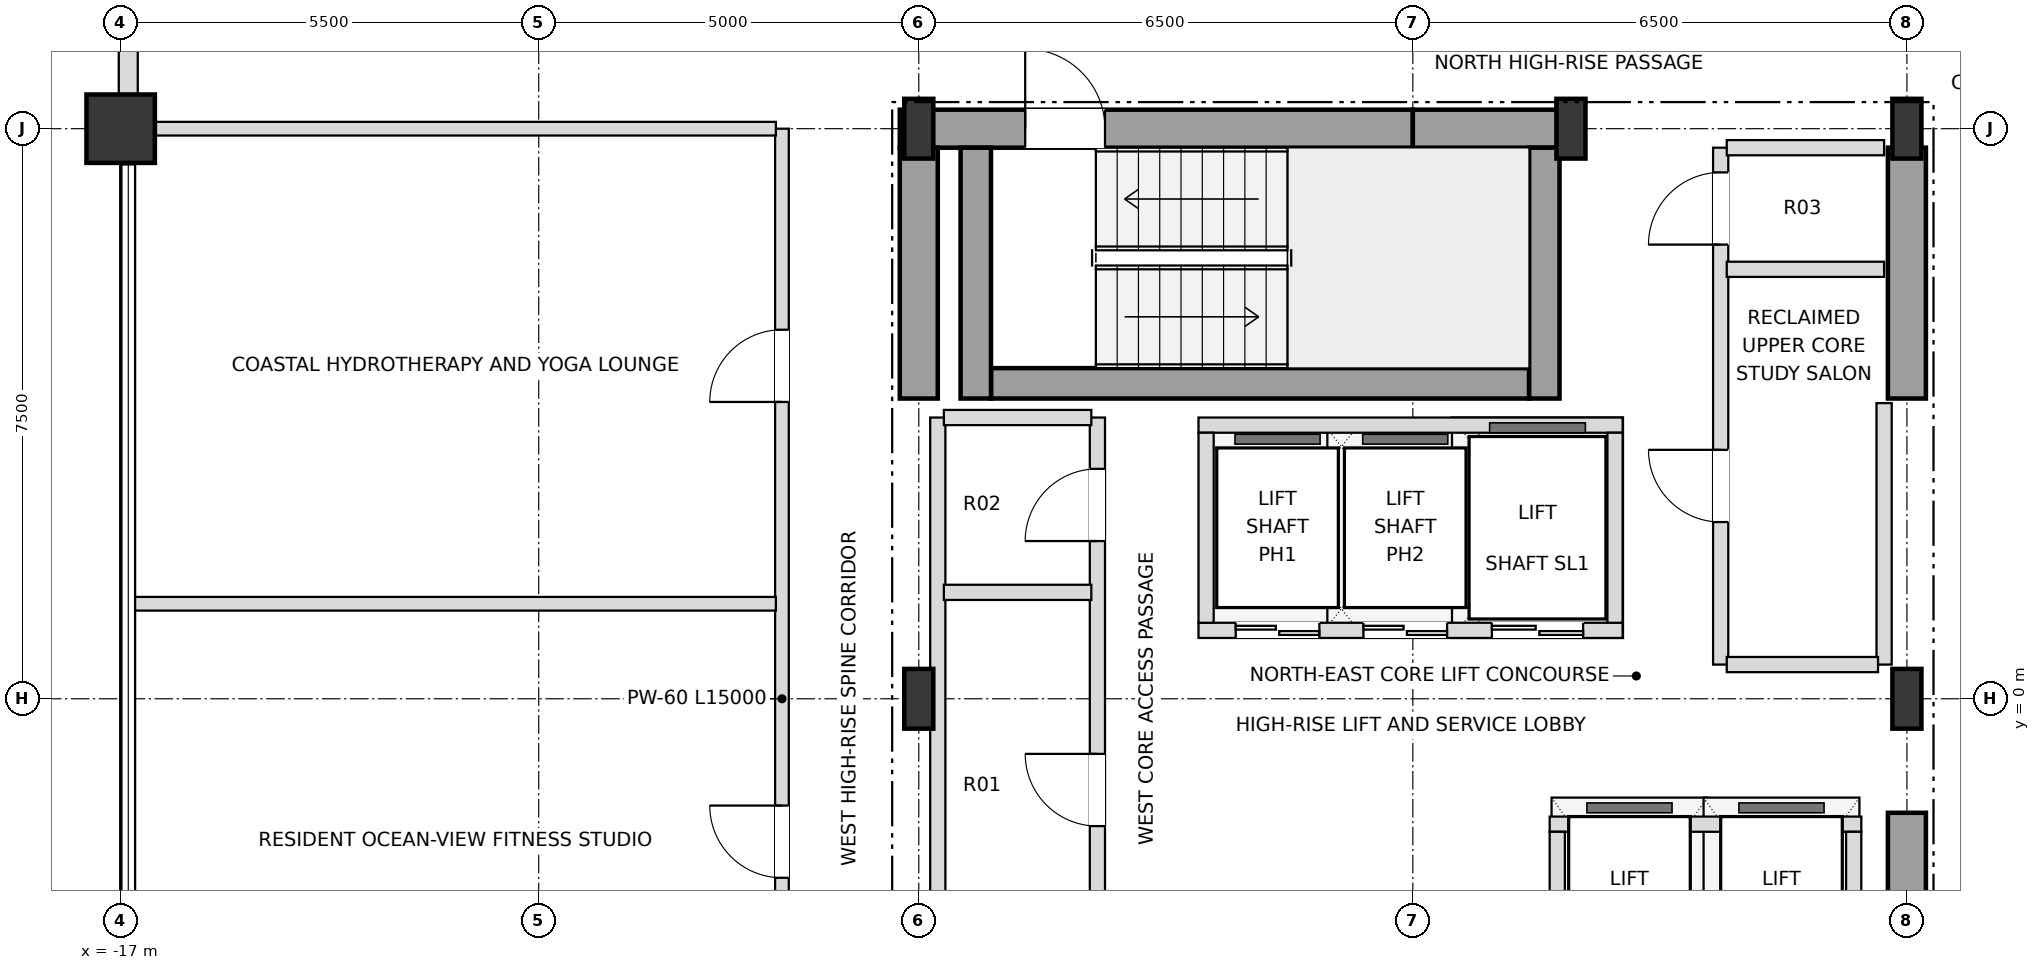
"""IFC4 building model, lengths in metres.
Left out: names, types, materials, properties, quantities, classifications, styles, units other than length and angle.
Written with IfcOpenShell. Run it as: python <this file> out.ifc"""

import sys

from ifc_helpers import new_model, si_unit, direction, frame, frame_2d, origin, origin_2d, place, context, subcontext, project, spatial, rectangle, i_section, extrude, element, fill, save


model = new_model("IFC4")
c1 = context("Model", 3, precision=1e-05, world=origin(), true_north=direction((0.0, 1.0)))
c2 = subcontext(c1, "Body", "Model", "MODEL_VIEW")
j1 = project(units=[si_unit("LENGTHUNIT", "METRE"), si_unit("PLANEANGLEUNIT", "RADIAN")], contexts=[c1])
p1 = place(None, origin())
s1 = spatial("IfcSite", under=j1, at=p1, CompositionType="ELEMENT")
p2 = place(p1, origin())
s2 = spatial("IfcBuilding", under=s1, at=p2, CompositionType="ELEMENT")
p3 = place(p2, frame((0.0, 0.0, 276.3)))
s3 = spatial("IfcBuildingStorey", under=s2, at=p3, CompositionType="ELEMENT", Elevation=276.3)
for number, where, z_axis, x_axis in (
    (1, (-6.5, 0.0, 0.0), (0.0, 0.0, 1.0), (1.0, 0.0, 0.0)),
    (2, (6.5, 0.0, 0.0), (0.0, 0.0, 1.0), (1.0, 0.0, 0.0)),
    (3, (-6.5, 7.5, 0.0), (0.0, 0.0, 1.0), (1.0, 0.0, 0.0)),
    (4, (2.08, 7.5, 0.0), (0.0, 0.0, 1.0), (1.0, 0.0, 0.0)),
    (5, (6.5, 7.5, 0.0), (0.0, 0.0, 1.0), (1.0, 0.0, 0.0)),
):
    element("IfcColumn", number, at=place(p3, frame(where, z_axis=z_axis, x_axis=x_axis)), inside=s3, PredefinedType="COLUMN", context=c2, shape_type="SweptSolid", body=[
        extrude(i_section(OverallWidth=0.382, OverallDepth=0.786, WebThickness=0.02, FlangeThickness=0.033, at=origin_2d()), origin(), (0.0, 0.0, 1.0), 3.6),
    ])
p4 = place(p3, frame((-17.0, 7.5, 0.0), z_axis=(0.0, 0.0, 1.0), x_axis=(1.0, 0.0, 0.0)))
e6 = element("IfcColumn", 6, at=p4, inside=s3, PredefinedType="USERDEFINED", context=c2, shape_type="SweptSolid", body=[
    extrude(rectangle(XDim=0.9, YDim=0.9, at=origin_2d()), origin(), (0.0, 0.0, 1.0), 3.6),
])
p5 = place(p3, frame((-16.9, 12.555, 0.0), z_axis=(0.0, 0.0, 1.0), x_axis=(0.0, -1.0, 0.0)))
e7 = element("IfcWall", 7, at=p5, inside=s3, PredefinedType="SOLIDWALL", context=c2, shape_type="SweptSolid", body=[
    extrude(rectangle(XDim=4.61, YDim=0.25, at=frame_2d((2.305, 0.0))), origin(), (0.0, 0.0, 1.0), 2.748),
])
p6 = place(p5, frame((1.405, 0.0, 0.72)))
e8 = element("IfcOpeningElement", 8, at=p6, cuts=e7, PredefinedType="OPENING", context=c2, shape_type="SweptSolid", body=[
    extrude(rectangle(XDim=1.8, YDim=1.68, at=frame_2d((0.9, 0.84))), frame((0.0, 0.135, 0.0), z_axis=(0.0, -1.0, 0.0), x_axis=(1.0, 0.0, 0.0)), (0.0, 0.0, 1.0), 0.27),
])
p7 = place(p3, frame((-6.75, 7.5, 0.0), z_axis=(0.0, 0.0, 1.0), x_axis=(1.0, 0.0, 0.0)))
e9 = element("IfcWall", 9, at=p7, inside=s3, PredefinedType="SHEAR", context=c2, shape_type="SweptSolid", body=[
    extrude(rectangle(XDim=6.75, YDim=0.5, at=frame_2d((3.375, 0.0))), origin(), (0.0, 0.0, 1.0), 3.38),
])
p8 = place(p7, frame((1.65, 0.0, 0.0)))
e10 = element("IfcOpeningElement", 10, at=p8, cuts=e9, PredefinedType="OPENING", context=c2, shape_type="SweptSolid", body=[
    extrude(rectangle(XDim=1.05, YDim=2.15, at=frame_2d((0.525, 1.075))), frame((0.0, 0.26, 0.0), z_axis=(0.0, -1.0, 0.0), x_axis=(1.0, 0.0, 0.0)), (0.0, 0.0, 1.0), 0.52),
])
p9 = place(p3, frame((0.0, 7.5, 0.0), z_axis=(0.0, 0.0, 1.0), x_axis=(1.0, 0.0, 0.0)))
e11 = element("IfcWall", 11, at=p9, inside=s3, PredefinedType="SHEAR", context=c2, shape_type="SweptSolid", body=[
    extrude(rectangle(XDim=2.08, YDim=0.5, at=frame_2d((1.04, 0.0))), origin(), (0.0, 0.0, 1.0), 3.38),
])
p10 = place(p3, frame((-6.5, 3.95, 0.0), z_axis=(0.0, 0.0, 1.0), x_axis=(0.0, 1.0, 0.0)))
e12 = element("IfcWall", 12, at=p10, inside=s3, PredefinedType="SHEAR", context=c2, shape_type="SweptSolid", body=[
    extrude(rectangle(XDim=3.3, YDim=0.5, at=frame_2d((1.65, 0.0))), origin(), (0.0, 0.0, 1.0), 3.38),
])
p11 = place(p3, frame((6.5, -7.25, 0.0), z_axis=(0.0, 0.0, 1.0), x_axis=(0.0, 1.0, 0.0)))
e13 = element("IfcWall", 13, at=p11, inside=s3, PredefinedType="SHEAR", context=c2, shape_type="SweptSolid", body=[
    extrude(rectangle(XDim=5.75, YDim=0.5, at=frame_2d((2.875, 0.0))), origin(), (0.0, 0.0, 1.0), 3.38),
])
p12 = place(p11, frame((0.85, 0.0, 0.0)))
e14 = element("IfcOpeningElement", 14, at=p12, cuts=e13, PredefinedType="OPENING", context=c2, shape_type="SweptSolid", body=[
    extrude(rectangle(XDim=1.05, YDim=2.15, at=frame_2d((0.525, 1.075))), frame((0.0, 0.26, 0.0), z_axis=(0.0, -1.0, 0.0), x_axis=(1.0, 0.0, 0.0)), (0.0, 0.0, 1.0), 0.52),
])
p13 = place(p3, frame((6.5, 3.95, 0.0), z_axis=(0.0, 0.0, 1.0), x_axis=(0.0, 1.0, 0.0)))
e15 = element("IfcWall", 15, at=p13, inside=s3, PredefinedType="SHEAR", context=c2, shape_type="SweptSolid", body=[
    extrude(rectangle(XDim=3.3, YDim=0.5, at=frame_2d((1.65, 0.0))), origin(), (0.0, 0.0, 1.0), 3.38),
])
p14 = place(p3, frame((-5.55, 4.15, 0.0), z_axis=(0.0, 0.0, 1.0), x_axis=(1.0, 0.0, 0.0)))
e16 = element("IfcWall", 16, at=p14, inside=s3, PredefinedType="SHEAR", context=c2, shape_type="SweptSolid", body=[
    extrude(rectangle(XDim=7.08, YDim=0.4, at=frame_2d((3.54, 0.0))), origin(), (0.0, 0.0, 1.0), 3.38),
])
for number, where, z_axis, x_axis in (
    (17, (1.73, 3.95, 0.0), (0.0, 0.0, 1.0), (0.0, 1.0, 0.0)),
    (18, (-5.75, 3.95, 0.0), (0.0, 0.0, 1.0), (0.0, 1.0, 0.0)),
):
    element("IfcWall", number, at=place(p3, frame(where, z_axis=z_axis, x_axis=x_axis)), inside=s3, PredefinedType="SHEAR", context=c2, shape_type="SweptSolid", body=[
        extrude(rectangle(XDim=3.3, YDim=0.4, at=frame_2d((1.65, 0.0))), origin(), (0.0, 0.0, 1.0), 3.38),
    ])
p15 = place(p3, frame((-2.82, 0.9, 0.0), z_axis=(0.0, 0.0, 1.0), x_axis=(1.0, 0.0, 0.0)))
e19 = element("IfcWall", 19, at=p15, inside=s3, PredefinedType="SOLIDWALL", context=c2, shape_type="SweptSolid", body=[
    extrude(rectangle(XDim=5.58, YDim=0.2, at=frame_2d((2.79, 0.0))), origin(), (0.0, 0.0, 1.0), 3.38),
])
p16 = place(p15, frame((0.49, 0.0, 0.0)))
e20 = element("IfcOpeningElement", 20, at=p16, cuts=e19, PredefinedType="OPENING", context=c2, shape_type="SweptSolid", body=[
    extrude(rectangle(XDim=1.1, YDim=2.15, at=frame_2d((0.55, 1.075))), frame((0.0, 0.11, 0.0), z_axis=(0.0, -1.0, 0.0), x_axis=(1.0, 0.0, 0.0)), (0.0, 0.0, 1.0), 0.22),
])
p17 = place(p15, frame((2.17, 0.0, 0.0)))
e21 = element("IfcOpeningElement", 21, at=p17, cuts=e19, PredefinedType="OPENING", context=c2, shape_type="SweptSolid", body=[
    extrude(rectangle(XDim=1.1, YDim=2.15, at=frame_2d((0.55, 1.075))), frame((0.0, 0.11, 0.0), z_axis=(0.0, -1.0, 0.0), x_axis=(1.0, 0.0, 0.0)), (0.0, 0.0, 1.0), 0.22),
])
p18 = place(p15, frame((3.86, 0.0, 0.0)))
e22 = element("IfcOpeningElement", 22, at=p18, cuts=e19, PredefinedType="OPENING", context=c2, shape_type="SweptSolid", body=[
    extrude(rectangle(XDim=1.2, YDim=2.2, at=frame_2d((0.6, 1.1))), frame((0.0, 0.11, 0.0), z_axis=(0.0, -1.0, 0.0), x_axis=(1.0, 0.0, 0.0)), (0.0, 0.0, 1.0), 0.22),
])
p19 = place(p3, frame((-2.82, 3.6, 0.0), z_axis=(0.0, 0.0, 1.0), x_axis=(1.0, 0.0, 0.0)))
e23 = element("IfcWall", 23, at=p19, inside=s3, PredefinedType="SOLIDWALL", context=c2, shape_type="SweptSolid", body=[
    extrude(rectangle(XDim=5.58, YDim=0.2, at=frame_2d((2.79, 0.0))), origin(), (0.0, 0.0, 1.0), 3.38),
])
for number, where, z_axis, x_axis in (
    (24, (-2.72, 1.0, 0.0), (0.0, 0.0, 1.0), (0.0, 1.0, 0.0)),
    (25, (2.66, 1.0, 0.0), (0.0, 0.0, 1.0), (0.0, 1.0, 0.0)),
):
    element("IfcWall", number, at=place(p3, frame(where, z_axis=z_axis, x_axis=x_axis)), inside=s3, PredefinedType="SOLIDWALL", context=c2, shape_type="SweptSolid", body=[
        extrude(rectangle(XDim=2.5, YDim=0.2, at=frame_2d((1.25, 0.0))), origin(), (0.0, 0.0, 1.0), 3.38),
    ])
p20 = place(p3, frame((1.8, -1.65, 0.0), z_axis=(0.0, 0.0, 1.0), x_axis=(1.0, 0.0, 0.0)))
e26 = element("IfcWall", 26, at=p20, inside=s3, PredefinedType="SOLIDWALL", context=c2, shape_type="SweptSolid", body=[
    extrude(rectangle(XDim=4.1, YDim=0.2, at=frame_2d((2.05, 0.0))), origin(), (0.0, 0.0, 1.0), 3.38),
])
for number, where, z_axis, x_axis in (
    (27, (1.9, -3.75, 0.0), (0.0, 0.0, 1.0), (0.0, 1.0, 0.0)),
    (28, (5.8, -3.75, 0.0), (0.0, 0.0, 1.0), (0.0, 1.0, 0.0)),
):
    element("IfcWall", number, at=place(p3, frame(where, z_axis=z_axis, x_axis=x_axis)), inside=s3, PredefinedType="SOLIDWALL", context=c2, shape_type="SweptSolid", body=[
        extrude(rectangle(XDim=2.0, YDim=0.2, at=frame_2d((1.0, 0.0))), origin(), (0.0, 0.0, 1.0), 3.38),
    ])
p21 = place(p3, frame((-8.3, -7.5, 0.0), z_axis=(0.0, 0.0, 1.0), x_axis=(0.0, 1.0, 0.0)))
e29 = element("IfcWall", 29, at=p21, inside=s3, PredefinedType="PARTITIONING", context=c2, shape_type="SweptSolid", body=[
    extrude(rectangle(XDim=15.0, YDim=0.18, at=frame_2d((7.5, 0.0))), origin(), (0.0, 0.0, 1.0), 3.38),
])
p22 = place(p21, frame((0.775, 0.0, 0.0)))
e30 = element("IfcOpeningElement", 30, at=p22, cuts=e29, PredefinedType="OPENING", context=c2, shape_type="SweptSolid", body=[
    extrude(rectangle(XDim=0.95, YDim=2.15, at=frame_2d((0.475, 1.075))), frame((0.0, 0.1, 0.0), z_axis=(0.0, -1.0, 0.0), x_axis=(1.0, 0.0, 0.0)), (0.0, 0.0, 1.0), 0.2),
])
p23 = place(p21, frame((5.145, 0.0, 0.0)))
e31 = element("IfcOpeningElement", 31, at=p23, cuts=e29, PredefinedType="OPENING", context=c2, shape_type="SweptSolid", body=[
    extrude(rectangle(XDim=0.95, YDim=2.15, at=frame_2d((0.475, 1.075))), frame((0.0, 0.1, 0.0), z_axis=(0.0, -1.0, 0.0), x_axis=(1.0, 0.0, 0.0)), (0.0, 0.0, 1.0), 0.2),
])
p24 = place(p21, frame((11.405, 0.0, 0.0)))
e32 = element("IfcOpeningElement", 32, at=p24, cuts=e29, PredefinedType="OPENING", context=c2, shape_type="SweptSolid", body=[
    extrude(rectangle(XDim=0.95, YDim=2.15, at=frame_2d((0.475, 1.075))), frame((0.0, 0.1, 0.0), z_axis=(0.0, -1.0, 0.0), x_axis=(1.0, 0.0, 0.0)), (0.0, 0.0, 1.0), 0.2),
])
p25 = place(p3, frame((-6.25, -3.64, 0.0), z_axis=(0.0, 0.0, 1.0), x_axis=(0.0, 1.0, 0.0)))
e33 = element("IfcWall", 33, at=p25, inside=s3, PredefinedType="SOLIDWALL", context=c2, shape_type="SweptSolid", body=[
    extrude(rectangle(XDim=7.34, YDim=0.2, at=frame_2d((3.67, 0.0))), origin(), (0.0, 0.0, 1.0), 3.38),
])
p26 = place(p3, frame((-4.15, -3.7, 0.0), z_axis=(0.0, 0.0, 1.0), x_axis=(0.0, 1.0, 0.0)))
e34 = element("IfcWall", 34, at=p26, inside=s3, PredefinedType="SOLIDWALL", context=c2, shape_type="SweptSolid", body=[
    extrude(rectangle(XDim=7.4, YDim=0.2, at=frame_2d((3.7, 0.0))), origin(), (0.0, 0.0, 1.0), 3.38),
])
p27 = place(p26, frame((2.025, 0.0, 0.0)))
e35 = element("IfcOpeningElement", 35, at=p27, cuts=e34, PredefinedType="OPENING", context=c2, shape_type="SweptSolid", body=[
    extrude(rectangle(XDim=0.95, YDim=2.15, at=frame_2d((0.475, 1.075))), frame((0.0, 0.11, 0.0), z_axis=(0.0, -1.0, 0.0), x_axis=(1.0, 0.0, 0.0)), (0.0, 0.0, 1.0), 0.22),
])
p28 = place(p26, frame((5.775, 0.0, 0.0)))
e36 = element("IfcOpeningElement", 36, at=p28, cuts=e34, PredefinedType="OPENING", context=c2, shape_type="SweptSolid", body=[
    extrude(rectangle(XDim=0.95, YDim=2.15, at=frame_2d((0.475, 1.075))), frame((0.0, 0.11, 0.0), z_axis=(0.0, -1.0, 0.0), x_axis=(1.0, 0.0, 0.0)), (0.0, 0.0, 1.0), 0.22),
])
p29 = place(p3, frame((4.05, 0.45, 0.0), z_axis=(0.0, 0.0, 1.0), x_axis=(0.0, 1.0, 0.0)))
e37 = element("IfcWall", 37, at=p29, inside=s3, PredefinedType="SOLIDWALL", context=c2, shape_type="SweptSolid", body=[
    extrude(rectangle(XDim=6.8, YDim=0.2, at=frame_2d((3.4, 0.0))), origin(), (0.0, 0.0, 1.0), 3.38),
])
p30 = place(p29, frame((1.875, 0.0, 0.0)))
e38 = element("IfcOpeningElement", 38, at=p30, cuts=e37, PredefinedType="OPENING", context=c2, shape_type="SweptSolid", body=[
    extrude(rectangle(XDim=0.95, YDim=2.15, at=frame_2d((0.475, 1.075))), frame((0.0, 0.11, 0.0), z_axis=(0.0, -1.0, 0.0), x_axis=(1.0, 0.0, 0.0)), (0.0, 0.0, 1.0), 0.22),
])
p31 = place(p29, frame((5.525, 0.0, 0.0)))
e39 = element("IfcOpeningElement", 39, at=p31, cuts=e37, PredefinedType="OPENING", context=c2, shape_type="SweptSolid", body=[
    extrude(rectangle(XDim=0.95, YDim=2.15, at=frame_2d((0.475, 1.075))), frame((0.0, 0.11, 0.0), z_axis=(0.0, -1.0, 0.0), x_axis=(1.0, 0.0, 0.0)), (0.0, 0.0, 1.0), 0.22),
])
p32 = place(p3, frame((6.2, 0.45, 0.0), z_axis=(0.0, 0.0, 1.0), x_axis=(0.0, 1.0, 0.0)))
e40 = element("IfcWall", 40, at=p32, inside=s3, PredefinedType="SOLIDWALL", context=c2, shape_type="SweptSolid", body=[
    extrude(rectangle(XDim=3.44, YDim=0.2, at=frame_2d((1.72, 0.0))), origin(), (0.0, 0.0, 1.0), 3.38),
])
p33 = place(p3, frame((4.13, 0.45, 0.0), z_axis=(0.0, 0.0, 1.0), x_axis=(1.0, 0.0, 0.0)))
e41 = element("IfcWall", 41, at=p33, inside=s3, PredefinedType="SOLIDWALL", context=c2, shape_type="SweptSolid", body=[
    extrude(rectangle(XDim=1.99, YDim=0.2, at=frame_2d((0.995, 0.0))), origin(), (0.0, 0.0, 1.0), 3.38),
])
p34 = place(p3, frame((-16.82, 1.25, 0.0), z_axis=(0.0, 0.0, 1.0), x_axis=(1.0, 0.0, 0.0)))
e42 = element("IfcWall", 42, at=p34, inside=s3, PredefinedType="PARTITIONING", context=c2, shape_type="SweptSolid", body=[
    extrude(rectangle(XDim=8.44, YDim=0.18, at=frame_2d((4.22, 0.0))), origin(), (0.0, 0.0, 1.0), 3.018),
])
for number, where, z_axis, x_axis in (
    (43, (-6.17, 1.4, 0.0), (0.0, 0.0, 1.0), (1.0, 0.0, 0.0)),
    (44, (-6.17, 3.7, 0.0), (0.0, 0.0, 1.0), (1.0, 0.0, 0.0)),
):
    element("IfcWall", number, at=place(p3, frame(where, z_axis=z_axis, x_axis=x_axis)), inside=s3, PredefinedType="SOLIDWALL", context=c2, shape_type="SweptSolid", body=[
        extrude(rectangle(XDim=1.94, YDim=0.2, at=frame_2d((0.97, 0.0))), origin(), (0.0, 0.0, 1.0), 3.38),
    ])
for number, where, z_axis, x_axis in (
    (45, (4.13, 5.65, 0.0), (0.0, 0.0, 1.0), (1.0, 0.0, 0.0)),
    (46, (4.13, 7.25, 0.0), (0.0, 0.0, 1.0), (1.0, 0.0, 0.0)),
):
    element("IfcWall", number, at=place(p3, frame(where, z_axis=z_axis, x_axis=x_axis)), inside=s3, PredefinedType="SOLIDWALL", context=c2, shape_type="SweptSolid", body=[
        extrude(rectangle(XDim=2.07, YDim=0.2, at=frame_2d((1.035, 0.0))), origin(), (0.0, 0.0, 1.0), 3.38),
    ])
p35 = place(p3, frame((-16.9, 7.5, 0.0), z_axis=(0.0, 0.0, 1.0), x_axis=(1.0, 0.0, 0.0)))
e47 = element("IfcWall", 47, at=p35, inside=s3, PredefinedType="PARTITIONING", context=c2, shape_type="SweptSolid", body=[
    extrude(rectangle(XDim=8.52, YDim=0.18, at=frame_2d((4.26, 0.0))), origin(), (0.0, 0.0, 1.0), 2.826),
])
p36 = place(p8, origin())
e48 = element("IfcDoor", 48, at=p36, inside=s3, OperationType="SINGLE_SWING_LEFT", PredefinedType="DOOR", context=c2, shape_type="SweptSolid", body=[
    extrude(rectangle(XDim=1.05, YDim=2.15, at=frame_2d((0.525, 1.075))), frame((0.0, 0.025, 0.0), z_axis=(0.0, -1.0, 0.0), x_axis=(1.0, 0.0, 0.0)), (0.0, 0.0, 1.0), 0.05),
])
fill(e10, e48)
p37 = place(p16, origin())
e49 = element("IfcDoor", 49, at=p37, inside=s3, OperationType="DOUBLE_DOOR_SLIDING", PredefinedType="DOOR", context=c2, shape_type="SweptSolid", body=[
    extrude(rectangle(XDim=1.1, YDim=2.15, at=frame_2d((0.55, 1.075))), frame((0.0, 0.025, 0.0), z_axis=(0.0, -1.0, 0.0), x_axis=(1.0, 0.0, 0.0)), (0.0, 0.0, 1.0), 0.05),
])
fill(e20, e49)
p38 = place(p17, origin())
e50 = element("IfcDoor", 50, at=p38, inside=s3, OperationType="DOUBLE_DOOR_SLIDING", PredefinedType="DOOR", context=c2, shape_type="SweptSolid", body=[
    extrude(rectangle(XDim=1.1, YDim=2.15, at=frame_2d((0.55, 1.075))), frame((0.0, 0.025, 0.0), z_axis=(0.0, -1.0, 0.0), x_axis=(1.0, 0.0, 0.0)), (0.0, 0.0, 1.0), 0.05),
])
fill(e21, e50)
p39 = place(p18, origin())
e51 = element("IfcDoor", 51, at=p39, inside=s3, OperationType="DOUBLE_DOOR_SLIDING", PredefinedType="DOOR", context=c2, shape_type="SweptSolid", body=[
    extrude(rectangle(XDim=1.2, YDim=2.2, at=frame_2d((0.6, 1.1))), frame((0.0, 0.025, 0.0), z_axis=(0.0, -1.0, 0.0), x_axis=(1.0, 0.0, 0.0)), (0.0, 0.0, 1.0), 0.05),
])
fill(e22, e51)
p40 = place(p27, origin())
e52 = element("IfcDoor", 52, at=p40, inside=s3, OperationType="SINGLE_SWING_RIGHT", PredefinedType="DOOR", context=c2, shape_type="SweptSolid", body=[
    extrude(rectangle(XDim=0.95, YDim=2.15, at=frame_2d((0.475, 1.075))), frame((0.0, 0.025, 0.0), z_axis=(0.0, -1.0, 0.0), x_axis=(1.0, 0.0, 0.0)), (0.0, 0.0, 1.0), 0.05),
])
fill(e35, e52)
p41 = place(p28, origin())
e53 = element("IfcDoor", 53, at=p41, inside=s3, OperationType="SINGLE_SWING_LEFT", PredefinedType="DOOR", context=c2, shape_type="SweptSolid", body=[
    extrude(rectangle(XDim=0.95, YDim=2.15, at=frame_2d((0.475, 1.075))), frame((0.0, 0.025, 0.0), z_axis=(0.0, -1.0, 0.0), x_axis=(1.0, 0.0, 0.0)), (0.0, 0.0, 1.0), 0.05),
])
fill(e36, e53)
p42 = place(p30, origin())
e54 = element("IfcDoor", 54, at=p42, inside=s3, OperationType="SINGLE_SWING_RIGHT", PredefinedType="DOOR", context=c2, shape_type="SweptSolid", body=[
    extrude(rectangle(XDim=0.95, YDim=2.15, at=frame_2d((0.475, 1.075))), frame((0.0, 0.025, 0.0), z_axis=(0.0, -1.0, 0.0), x_axis=(1.0, 0.0, 0.0)), (0.0, 0.0, 1.0), 0.05),
])
fill(e38, e54)
p43 = place(p31, origin())
e55 = element("IfcDoor", 55, at=p43, inside=s3, OperationType="SINGLE_SWING_LEFT", PredefinedType="DOOR", context=c2, shape_type="SweptSolid", body=[
    extrude(rectangle(XDim=0.95, YDim=2.15, at=frame_2d((0.475, 1.075))), frame((0.0, 0.025, 0.0), z_axis=(0.0, -1.0, 0.0), x_axis=(1.0, 0.0, 0.0)), (0.0, 0.0, 1.0), 0.05),
])
fill(e39, e55)
p44 = place(p23, origin())
e56 = element("IfcDoor", 56, at=p44, inside=s3, OperationType="SINGLE_SWING_RIGHT", PredefinedType="DOOR", context=c2, shape_type="SweptSolid", body=[
    extrude(rectangle(XDim=0.95, YDim=2.15, at=frame_2d((0.475, 1.075))), frame((0.0, 0.025, 0.0), z_axis=(0.0, -1.0, 0.0), x_axis=(1.0, 0.0, 0.0)), (0.0, 0.0, 1.0), 0.05),
])
fill(e31, e56)
p45 = place(p24, origin())
e57 = element("IfcDoor", 57, at=p45, inside=s3, OperationType="SINGLE_SWING_LEFT", PredefinedType="DOOR", context=c2, shape_type="SweptSolid", body=[
    extrude(rectangle(XDim=0.95, YDim=2.15, at=frame_2d((0.475, 1.075))), frame((0.0, 0.025, 0.0), z_axis=(0.0, -1.0, 0.0), x_axis=(1.0, 0.0, 0.0)), (0.0, 0.0, 1.0), 0.05),
])
fill(e32, e57)
save(model, sys.argv[1])
